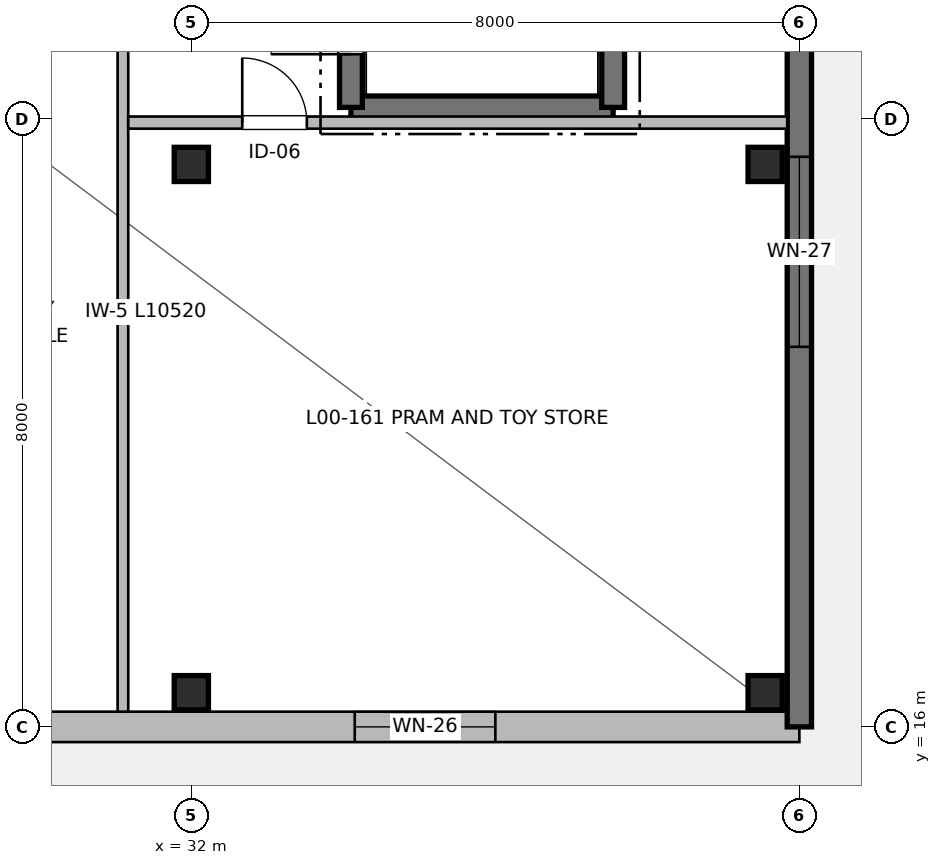
"""IFC4 building model, lengths in metres.
Left out: names, types, materials, properties, quantities, classifications, styles, units other than length and angle.
Written with IfcOpenShell. Run it as: python <this file> out.ifc"""

import sys

from ifc_helpers import new_model, si_unit, direction, frame, frame_2d, origin, origin_2d, place, context, subcontext, project, spatial, rectangle, extrude, element, fill, save


model = new_model("IFC4")
c1 = context("Model", 3, precision=1e-05, world=origin(), true_north=direction((0.0, 1.0)))
c2 = subcontext(c1, "Body", "Model", "MODEL_VIEW")
j1 = project(units=[si_unit("LENGTHUNIT", "METRE"), si_unit("PLANEANGLEUNIT", "RADIAN")], contexts=[c1])
p1 = place(None, origin())
s1 = spatial("IfcSite", under=j1, at=p1, CompositionType="ELEMENT")
p2 = place(p1, origin())
s2 = spatial("IfcBuilding", under=s1, at=p2, CompositionType="ELEMENT")
p3 = place(p2, origin())
s3 = spatial("IfcBuildingStorey", under=s2, at=p3, CompositionType="ELEMENT", Elevation=0.0)
for number, where, z_axis, x_axis in (
    (1, (32.0, 16.45, 0.0), (0.0, 0.0, 1.0), (1.0, 0.0, 0.0)),
    (2, (32.0, 23.4, 0.0), (0.0, 0.0, 1.0), (1.0, 0.0, 0.0)),
    (3, (39.55, 16.45, 0.0), (0.0, 0.0, 1.0), (1.0, 0.0, 0.0)),
    (4, (39.55, 23.4, 0.0), (0.0, 0.0, 1.0), (1.0, 0.0, 0.0)),
):
    element("IfcColumn", number, at=place(p3, frame(where, z_axis=z_axis, x_axis=x_axis)), inside=s3, PredefinedType="COLUMN", context=c2, shape_type="SweptSolid", body=[
        extrude(rectangle(XDim=0.45, YDim=0.45, at=origin_2d()), origin(), (0.0, 0.0, 1.0), 4.16),
    ])
p4 = place(p3, frame((40.0, 16.0, 0.0), z_axis=(0.0, 0.0, 1.0), x_axis=(-1.0, 0.0, 0.0)))
e5 = element("IfcWall", 5, at=p4, inside=s3, PredefinedType="SOLIDWALL", context=c2, shape_type="SweptSolid", body=[
    extrude(rectangle(XDim=32.0, YDim=0.4, at=frame_2d((16.0, 0.0))), origin(), (0.0, 0.0, 1.0), 3.9),
])
p5 = place(p4, frame((16.9, 0.0, 0.0)))
e6 = element("IfcOpeningElement", 6, at=p5, cuts=e5, PredefinedType="OPENING", context=c2, shape_type="SweptSolid", body=[
    extrude(rectangle(XDim=1.1, YDim=2.2, at=frame_2d((0.55, 1.1))), frame((0.0, 0.21, 0.0), z_axis=(0.0, -1.0, 0.0), x_axis=(1.0, 0.0, 0.0)), (0.0, 0.0, 1.0), 0.42),
])
p6 = place(p4, frame((24.18, 0.0, 0.0)))
e7 = element("IfcOpeningElement", 7, at=p6, cuts=e5, PredefinedType="OPENING", context=c2, shape_type="SweptSolid", body=[
    extrude(rectangle(XDim=1.25, YDim=2.2, at=frame_2d((0.625, 1.1))), frame((0.0, 0.21, 0.0), z_axis=(0.0, -1.0, 0.0), x_axis=(1.0, 0.0, 0.0)), (0.0, 0.0, 1.0), 0.42),
])
p7 = place(p4, frame((4.0, 0.0, 0.75)))
e8 = element("IfcOpeningElement", 8, at=p7, cuts=e5, PredefinedType="OPENING", context=c2, shape_type="SweptSolid", body=[
    extrude(rectangle(XDim=1.85, YDim=1.6, at=frame_2d((0.925, 0.8))), frame((0.0, 0.21, 0.0), z_axis=(0.0, -1.0, 0.0), x_axis=(1.0, 0.0, 0.0)), (0.0, 0.0, 1.0), 0.42),
])
p8 = place(p4, frame((27.0, 0.0, 0.75)))
e9 = element("IfcOpeningElement", 9, at=p8, cuts=e5, PredefinedType="OPENING", context=c2, shape_type="SweptSolid", body=[
    extrude(rectangle(XDim=1.85, YDim=1.6, at=frame_2d((0.925, 0.8))), frame((0.0, 0.21, 0.0), z_axis=(0.0, -1.0, 0.0), x_axis=(1.0, 0.0, 0.0)), (0.0, 0.0, 1.0), 0.42),
])
p9 = place(p3, frame((40.0, 40.0, 0.0), z_axis=(0.0, 0.0, 1.0), x_axis=(0.0, -1.0, 0.0)))
e10 = element("IfcWall", 10, at=p9, inside=s3, PredefinedType="SHEAR", context=c2, shape_type="SweptSolid", body=[
    extrude(rectangle(XDim=24.0, YDim=0.32, at=frame_2d((12.0, 0.0))), origin(), (0.0, 0.0, 1.0), 3.9),
])
p10 = place(p9, frame((4.5, 0.0, 0.8)))
e11 = element("IfcOpeningElement", 11, at=p10, cuts=e10, PredefinedType="OPENING", context=c2, shape_type="SweptSolid", body=[
    extrude(rectangle(XDim=2.5, YDim=1.65, at=frame_2d((1.25, 0.825))), frame((0.0, 0.17, 0.0), z_axis=(0.0, -1.0, 0.0), x_axis=(1.0, 0.0, 0.0)), (0.0, 0.0, 1.0), 0.34),
])
p11 = place(p9, frame((16.5, 0.0, 0.8)))
e12 = element("IfcOpeningElement", 12, at=p11, cuts=e10, PredefinedType="OPENING", context=c2, shape_type="SweptSolid", body=[
    extrude(rectangle(XDim=2.5, YDim=1.65, at=frame_2d((1.25, 0.825))), frame((0.0, 0.17, 0.0), z_axis=(0.0, -1.0, 0.0), x_axis=(1.0, 0.0, 0.0)), (0.0, 0.0, 1.0), 0.34),
])
p12 = place(p3, frame((34.1, 24.15, 0.0), z_axis=(0.0, 0.0, 1.0), x_axis=(1.0, 0.0, 0.0)))
e13 = element("IfcWall", 13, at=p12, inside=s3, PredefinedType="SHEAR", context=c2, shape_type="SweptSolid", body=[
    extrude(rectangle(XDim=3.45, YDim=0.3, at=frame_2d((1.725, 0.0))), origin(), (0.0, 0.0, 1.0), 4.16),
])
p13 = place(p3, frame((37.55, 31.05, 0.0), z_axis=(0.0, 0.0, 1.0), x_axis=(0.0, -1.0, 0.0)))
e14 = element("IfcWall", 14, at=p13, inside=s3, PredefinedType="SHEAR", context=c2, shape_type="SweptSolid", body=[
    extrude(rectangle(XDim=6.9, YDim=0.3, at=frame_2d((3.45, 0.0))), origin(), (0.0, 0.0, 1.0), 4.16),
])
p14 = place(p3, frame((34.1, 24.15, 0.0), z_axis=(0.0, 0.0, 1.0), x_axis=(0.0, 1.0, 0.0)))
e15 = element("IfcWall", 15, at=p14, inside=s3, PredefinedType="SHEAR", context=c2, shape_type="SweptSolid", body=[
    extrude(rectangle(XDim=6.9, YDim=0.3, at=frame_2d((3.45, 0.0))), origin(), (0.0, 0.0, 1.0), 4.16),
])
p15 = place(p14, frame((0.7, 0.0, 0.0)))
e16 = element("IfcOpeningElement", 16, at=p15, cuts=e15, PredefinedType="OPENING", context=c2, shape_type="SweptSolid", body=[
    extrude(rectangle(XDim=1.05, YDim=2.15, at=frame_2d((0.525, 1.075))), frame((0.0, 0.16, 0.0), z_axis=(0.0, -1.0, 0.0), x_axis=(1.0, 0.0, 0.0)), (0.0, 0.0, 1.0), 0.32),
])
p16 = place(p3, frame((31.1, 16.2, 0.0), z_axis=(0.0, 0.0, 1.0), x_axis=(0.0, 1.0, 0.0)))
e17 = element("IfcWall", 17, at=p16, inside=s3, PredefinedType="PARTITIONING", context=c2, shape_type="SweptSolid", body=[
    extrude(rectangle(XDim=10.52, YDim=0.14, at=frame_2d((5.26, 0.0))), origin(), (0.0, 0.0, 1.0), 3.89),
])
p17 = place(p3, frame((31.17, 23.95, 0.0), z_axis=(0.0, 0.0, 1.0), x_axis=(1.0, 0.0, 0.0)))
e18 = element("IfcWall", 18, at=p17, inside=s3, PredefinedType="PARTITIONING", context=c2, shape_type="SweptSolid", body=[
    extrude(rectangle(XDim=8.67, YDim=0.16, at=frame_2d((4.335, 0.0))), origin(), (0.0, 0.0, 1.0), 3.89),
])
p18 = place(p17, frame((1.5, 0.0, 0.0)))
e19 = element("IfcOpeningElement", 19, at=p18, cuts=e18, PredefinedType="OPENING", context=c2, shape_type="SweptSolid", body=[
    extrude(rectangle(XDim=0.85, YDim=2.05, at=frame_2d((0.425, 1.025))), frame((0.0, 0.09, 0.0), z_axis=(0.0, -1.0, 0.0), x_axis=(1.0, 0.0, 0.0)), (0.0, 0.0, 1.0), 0.18),
])
p19 = place(p7, origin())
e20 = element("IfcWindow", 20, at=p19, inside=s3, PartitioningType="SINGLE_PANEL", PredefinedType="WINDOW", context=c2, shape_type="SweptSolid", body=[
    extrude(rectangle(XDim=1.85, YDim=1.6, at=frame_2d((0.925, 0.8))), frame((0.0, 0.03, 0.0), z_axis=(0.0, -1.0, 0.0), x_axis=(1.0, 0.0, 0.0)), (0.0, 0.0, 1.0), 0.06),
])
fill(e8, e20)
p20 = place(p11, origin())
e21 = element("IfcWindow", 21, at=p20, inside=s3, PartitioningType="SINGLE_PANEL", PredefinedType="WINDOW", context=c2, shape_type="SweptSolid", body=[
    extrude(rectangle(XDim=2.5, YDim=1.65, at=frame_2d((1.25, 0.825))), frame((0.0, 0.03, 0.0), z_axis=(0.0, -1.0, 0.0), x_axis=(1.0, 0.0, 0.0)), (0.0, 0.0, 1.0), 0.06),
])
fill(e12, e21)
p21 = place(p15, origin())
e22 = element("IfcDoor", 22, at=p21, inside=s3, OperationType="SINGLE_SWING_LEFT", PredefinedType="DOOR", context=c2, shape_type="SweptSolid", body=[
    extrude(rectangle(XDim=1.05, YDim=2.15, at=frame_2d((0.525, 1.075))), frame((0.0, 0.025, 0.0), z_axis=(0.0, -1.0, 0.0), x_axis=(1.0, 0.0, 0.0)), (0.0, 0.0, 1.0), 0.05),
])
fill(e16, e22)
p22 = place(p18, origin())
e23 = element("IfcDoor", 23, at=p22, inside=s3, OperationType="SINGLE_SWING_LEFT", PredefinedType="DOOR", context=c2, shape_type="SweptSolid", body=[
    extrude(rectangle(XDim=0.85, YDim=2.05, at=frame_2d((0.425, 1.025))), frame((0.0, 0.025, 0.0), z_axis=(0.0, -1.0, 0.0), x_axis=(1.0, 0.0, 0.0)), (0.0, 0.0, 1.0), 0.05),
])
fill(e19, e23)
save(model, sys.argv[1])
